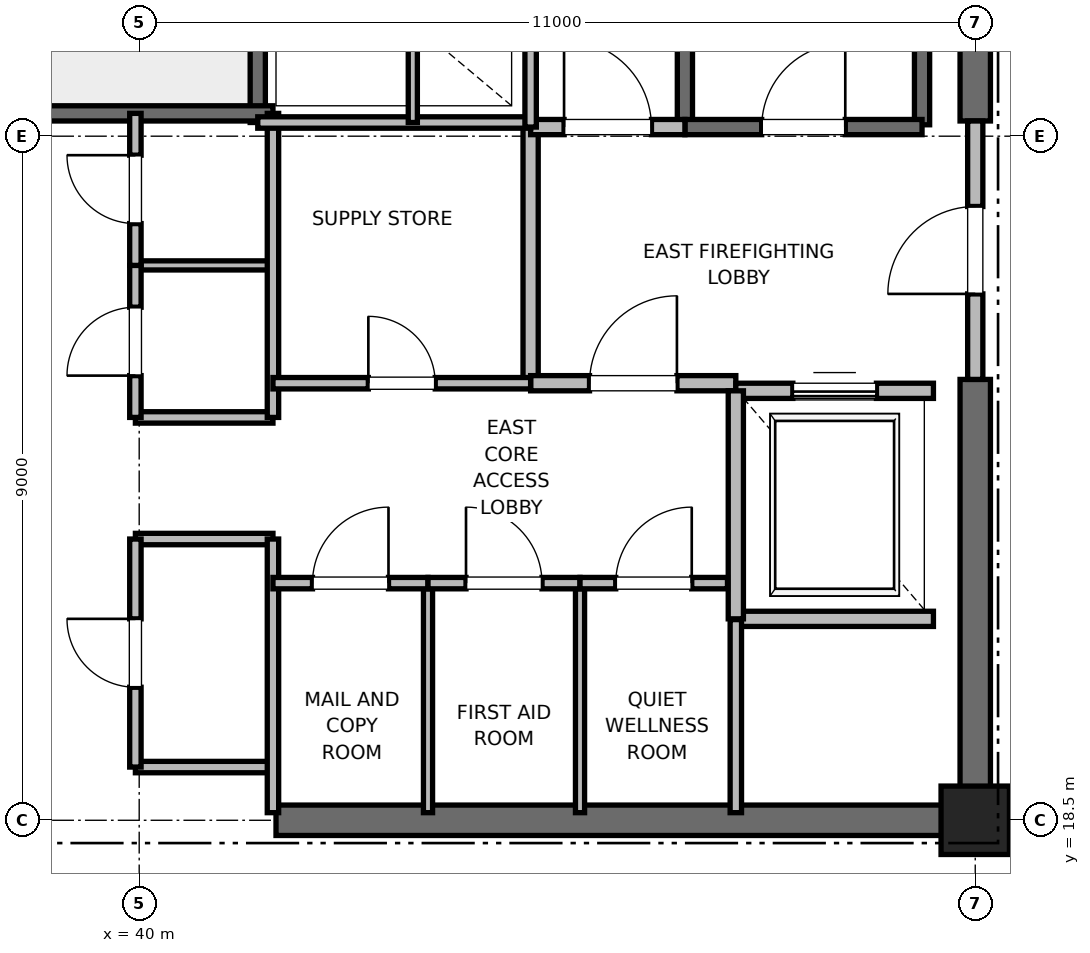
"""IFC4 building model, lengths in metres.
Left out: names, types, materials, properties, quantities, classifications, styles, units other than length and angle.
Written with IfcOpenShell. Run it as: python <this file> out.ifc"""

import sys

from ifc_helpers import new_model, si_unit, direction, frame, frame_2d, origin, origin_2d, place, context, subcontext, project, spatial, rectangle, extrude, element, fill, save


model = new_model("IFC4")
c1 = context("Model", 3, precision=1e-05, world=origin(), true_north=direction((0.0, 1.0)))
c2 = subcontext(c1, "Body", "Model", "MODEL_VIEW")
j1 = project(units=[si_unit("LENGTHUNIT", "METRE"), si_unit("PLANEANGLEUNIT", "RADIAN")], contexts=[c1])
p1 = place(None, origin())
s1 = spatial("IfcSite", under=j1, at=p1, CompositionType="ELEMENT")
p2 = place(p1, origin())
s2 = spatial("IfcBuilding", under=s1, at=p2, CompositionType="ELEMENT")
p3 = place(p2, frame((0.0, 0.0, 306.8)))
s3 = spatial("IfcBuildingStorey", under=s2, at=p3, CompositionType="ELEMENT", Elevation=306.8)
p4 = place(p3, frame((51.0, 18.5, 0.0), z_axis=(0.0, 0.0, 1.0), x_axis=(1.0, 0.0, 0.0)))
e1 = element("IfcColumn", 1, at=p4, inside=s3, PredefinedType="PILASTER", context=c2, shape_type="SweptSolid", body=[
    extrude(rectangle(XDim=0.9, YDim=0.9, at=origin_2d()), origin(), (0.0, 0.0, 1.0), 4.0),
])
p5 = place(p3, frame((41.8, 18.5, 0.0), z_axis=(0.0, 0.0, 1.0), x_axis=(1.0, 0.0, 0.0)))
e2 = element("IfcWall", 2, at=p5, inside=s3, PredefinedType="SHEAR", context=c2, shape_type="SweptSolid", body=[
    extrude(rectangle(XDim=9.2, YDim=0.4, at=frame_2d((4.6, 0.0))), origin(), (0.0, 0.0, 1.0), 3.785),
])
p6 = place(p3, frame((51.0, 18.5, 0.0), z_axis=(0.0, 0.0, 1.0), x_axis=(0.0, 1.0, 0.0)))
e3 = element("IfcWall", 3, at=p6, inside=s3, PredefinedType="SHEAR", context=c2, shape_type="SweptSolid", body=[
    extrude(rectangle(XDim=5.8, YDim=0.4, at=frame_2d((2.9, 0.0))), origin(), (0.0, 0.0, 1.0), 3.785),
])
p7 = place(p3, frame((51.0, 27.7, 0.0), z_axis=(0.0, 0.0, 1.0), x_axis=(0.0, 1.0, 0.0)))
e4 = element("IfcWall", 4, at=p7, inside=s3, PredefinedType="SHEAR", context=c2, shape_type="SweptSolid", body=[
    extrude(rectangle(XDim=8.8, YDim=0.4, at=frame_2d((4.4, 0.0))), origin(), (0.0, 0.0, 1.0), 3.785),
])
p8 = place(p3, frame((50.3, 27.65, 0.0), z_axis=(0.0, 0.0, 1.0), x_axis=(0.0, 1.0, 0.0)))
e5 = element("IfcWall", 5, at=p8, inside=s3, PredefinedType="SOLIDWALL", context=c2, shape_type="SweptSolid", body=[
    extrude(rectangle(XDim=8.15, YDim=0.2, at=frame_2d((4.075, 0.0))), origin(), (0.0, 0.0, 1.0), 3.785),
])
p9 = place(p3, frame((47.18, 27.62, 0.0), z_axis=(0.0, 0.0, 1.0), x_axis=(0.0, 1.0, 0.0)))
e6 = element("IfcWall", 6, at=p9, inside=s3, PredefinedType="SOLIDWALL", context=c2, shape_type="SweptSolid", body=[
    extrude(rectangle(XDim=8.18, YDim=0.2, at=frame_2d((4.09, 0.0))), origin(), (0.0, 0.0, 1.0), 3.785),
])
p10 = place(p3, frame((47.18, 27.62, 0.0), z_axis=(0.0, 0.0, 1.0), x_axis=(1.0, 0.0, 0.0)))
e7 = element("IfcWall", 7, at=p10, inside=s3, PredefinedType="SOLIDWALL", context=c2, shape_type="SweptSolid", body=[
    extrude(rectangle(XDim=3.12, YDim=0.2, at=frame_2d((1.56, 0.0))), origin(), (0.0, 0.0, 1.0), 3.785),
])
p11 = place(p10, frame((1.01, 0.0, 0.0)))
e8 = element("IfcOpeningElement", 8, at=p11, cuts=e7, PredefinedType="OPENING", context=c2, shape_type="SweptSolid", body=[
    extrude(rectangle(XDim=1.1, YDim=2.15, at=frame_2d((0.55, 1.075))), frame((0.0, 0.1, 0.0), z_axis=(0.0, -1.0, 0.0), x_axis=(1.0, 0.0, 0.0)), (0.0, 0.0, 1.0), 0.2),
])
p12 = place(p3, frame((41.56, 27.68, 0.0), z_axis=(0.0, 0.0, 1.0), x_axis=(0.0, 1.0, 0.0)))
e9 = element("IfcWall", 9, at=p12, inside=s3, PredefinedType="SOLIDWALL", context=c2, shape_type="SweptSolid", body=[
    extrude(rectangle(XDim=8.57, YDim=0.2, at=frame_2d((4.285, 0.0))), origin(), (0.0, 0.0, 1.0), 3.785),
])
p13 = place(p3, frame((38.44, 27.8, 0.0), z_axis=(0.0, 0.0, 1.0), x_axis=(1.0, 0.0, 0.0)))
e10 = element("IfcWall", 10, at=p13, inside=s3, PredefinedType="SOLIDWALL", context=c2, shape_type="SweptSolid", body=[
    extrude(rectangle(XDim=3.32, YDim=0.2, at=frame_2d((1.66, 0.0))), origin(), (0.0, 0.0, 1.0), 3.785),
])
p14 = place(p3, frame((45.15, 24.25, 0.0), z_axis=(0.0, 0.0, 1.0), x_axis=(0.0, 1.0, 0.0)))
e11 = element("IfcWall", 11, at=p14, inside=s3, PredefinedType="PARTITIONING", context=c2, shape_type="SweptSolid", body=[
    extrude(rectangle(XDim=3.37, YDim=0.2, at=frame_2d((1.685, 0.0))), origin(), (0.0, 0.0, 1.0), 3.785),
])
p15 = place(p3, frame((45.15, 24.25, 0.0), z_axis=(0.0, 0.0, 1.0), x_axis=(1.0, 0.0, 0.0)))
e12 = element("IfcWall", 12, at=p15, inside=s3, PredefinedType="PARTITIONING", context=c2, shape_type="SweptSolid", body=[
    extrude(rectangle(XDim=2.7, YDim=0.2, at=frame_2d((1.35, 0.0))), origin(), (0.0, 0.0, 1.0), 3.785),
])
p16 = place(p15, frame((0.775, 0.0, 0.0)))
e13 = element("IfcOpeningElement", 13, at=p16, cuts=e12, PredefinedType="OPENING", context=c2, shape_type="SweptSolid", body=[
    extrude(rectangle(XDim=1.15, YDim=2.2, at=frame_2d((0.575, 1.1))), frame((0.0, 0.1, 0.0), z_axis=(0.0, -1.0, 0.0), x_axis=(1.0, 0.0, 0.0)), (0.0, 0.0, 1.0), 0.2),
])
p17 = place(p3, frame((45.15, 27.62, 0.0), z_axis=(0.0, 0.0, 1.0), x_axis=(1.0, 0.0, 0.0)))
e14 = element("IfcWall", 14, at=p17, inside=s3, PredefinedType="PARTITIONING", context=c2, shape_type="SweptSolid", body=[
    extrude(rectangle(XDim=2.03, YDim=0.2, at=frame_2d((1.015, 0.0))), origin(), (0.0, 0.0, 1.0), 3.785),
])
p18 = place(p17, frame((0.44, 0.0, 0.0)))
e15 = element("IfcOpeningElement", 15, at=p18, cuts=e14, PredefinedType="OPENING", context=c2, shape_type="SweptSolid", body=[
    extrude(rectangle(XDim=1.15, YDim=2.2, at=frame_2d((0.575, 1.1))), frame((0.0, 0.1, 0.0), z_axis=(0.0, -1.0, 0.0), x_axis=(1.0, 0.0, 0.0)), (0.0, 0.0, 1.0), 0.2),
])
p19 = place(p3, frame((51.0, 24.3, 0.0), z_axis=(0.0, 0.0, 1.0), x_axis=(0.0, 1.0, 0.0)))
e16 = element("IfcWall", 16, at=p19, inside=s3, PredefinedType="PARTITIONING", context=c2, shape_type="SweptSolid", body=[
    extrude(rectangle(XDim=3.4, YDim=0.2, at=frame_2d((1.7, 0.0))), origin(), (0.0, 0.0, 1.0), 2.865),
])
p20 = place(p19, frame((1.125, 0.0, 0.0)))
e17 = element("IfcOpeningElement", 17, at=p20, cuts=e16, PredefinedType="OPENING", context=c2, shape_type="SweptSolid", body=[
    extrude(rectangle(XDim=1.15, YDim=2.2, at=frame_2d((0.575, 1.1))), frame((0.0, 0.1, 0.0), z_axis=(0.0, -1.0, 0.0), x_axis=(1.0, 0.0, 0.0)), (0.0, 0.0, 1.0), 0.2),
])
p21 = place(p3, frame((47.85, 21.15, 0.0), z_axis=(0.0, 0.0, 1.0), x_axis=(1.0, 0.0, 0.0)))
e18 = element("IfcWall", 18, at=p21, inside=s3, PredefinedType="SOLIDWALL", context=c2, shape_type="SweptSolid", body=[
    extrude(rectangle(XDim=2.6, YDim=0.2, at=frame_2d((1.3, 0.0))), origin(), (0.0, 0.0, 1.0), 3.785),
])
p22 = place(p3, frame((50.45, 24.15, 0.0), z_axis=(0.0, 0.0, 1.0), x_axis=(-1.0, 0.0, 0.0)))
e19 = element("IfcWall", 19, at=p22, inside=s3, PredefinedType="SOLIDWALL", context=c2, shape_type="SweptSolid", body=[
    extrude(rectangle(XDim=2.6, YDim=0.2, at=frame_2d((1.3, 0.0))), origin(), (0.0, 0.0, 1.0), 2.865),
])
p23 = place(p22, frame((0.75, 0.0, 0.0)))
e20 = element("IfcOpeningElement", 20, at=p23, cuts=e19, PredefinedType="OPENING", context=c2, shape_type="SweptSolid", body=[
    extrude(rectangle(XDim=1.1, YDim=2.2, at=frame_2d((0.55, 1.1))), frame((0.0, 0.1, 0.0), z_axis=(0.0, -1.0, 0.0), x_axis=(1.0, 0.0, 0.0)), (0.0, 0.0, 1.0), 0.2),
])
p24 = place(p3, frame((47.85, 24.15, 0.0), z_axis=(0.0, 0.0, 1.0), x_axis=(0.0, -1.0, 0.0)))
e21 = element("IfcWall", 21, at=p24, inside=s3, PredefinedType="SOLIDWALL", context=c2, shape_type="SweptSolid", body=[
    extrude(rectangle(XDim=3.0, YDim=0.2, at=frame_2d((1.5, 0.0))), origin(), (0.0, 0.0, 1.0), 3.785),
])
for number, where, z_axis, x_axis in (
    (22, (39.95, 19.2, 0.0), (0.0, 0.0, 1.0), (1.0, 0.0, 0.0)),
    (23, (39.95, 22.2, 0.0), (0.0, 0.0, 1.0), (1.0, 0.0, 0.0)),
    (24, (39.95, 23.8, 0.0), (0.0, 0.0, 1.0), (1.0, 0.0, 0.0)),
):
    element("IfcWall", number, at=place(p3, frame(where, z_axis=z_axis, x_axis=x_axis)), inside=s3, PredefinedType="PARTITIONING", context=c2, shape_type="SweptSolid", body=[
        extrude(rectangle(XDim=1.81, YDim=0.15, at=frame_2d((0.905, 0.0))), origin(), (0.0, 0.0, 1.0), 2.85),
    ])
p25 = place(p3, frame((39.95, 25.8, 0.0), z_axis=(0.0, 0.0, 1.0), x_axis=(1.0, 0.0, 0.0)))
e25 = element("IfcWall", 25, at=p25, inside=s3, PredefinedType="PARTITIONING", context=c2, shape_type="SweptSolid", body=[
    extrude(rectangle(XDim=1.81, YDim=0.12, at=frame_2d((0.905, 0.0))), origin(), (0.0, 0.0, 1.0), 2.85),
])
p26 = place(p3, frame((41.76, 18.6, 0.0), z_axis=(0.0, 0.0, 1.0), x_axis=(0.0, 1.0, 0.0)))
e26 = element("IfcWall", 26, at=p26, inside=s3, PredefinedType="PARTITIONING", context=c2, shape_type="SweptSolid", body=[
    extrude(rectangle(XDim=3.6, YDim=0.15, at=frame_2d((1.8, 0.0))), origin(), (0.0, 0.0, 1.0), 2.85),
])
p27 = place(p3, frame((41.76, 23.8, 0.0), z_axis=(0.0, 0.0, 1.0), x_axis=(0.0, 1.0, 0.0)))
e27 = element("IfcWall", 27, at=p27, inside=s3, PredefinedType="PARTITIONING", context=c2, shape_type="SweptSolid", body=[
    extrude(rectangle(XDim=4.0, YDim=0.15, at=frame_2d((2.0, 0.0))), origin(), (0.0, 0.0, 1.0), 2.85),
])
p28 = place(p3, frame((39.95, 19.2, 0.0), z_axis=(0.0, 0.0, 1.0), x_axis=(0.0, 1.0, 0.0)))
e28 = element("IfcWall", 28, at=p28, inside=s3, PredefinedType="PARTITIONING", context=c2, shape_type="SweptSolid", body=[
    extrude(rectangle(XDim=3.0, YDim=0.15, at=frame_2d((1.5, 0.0))), origin(), (0.0, 0.0, 1.0), 2.85),
])
p29 = place(p28, frame((1.05, 0.0, 0.0)))
e29 = element("IfcOpeningElement", 29, at=p29, cuts=e28, PredefinedType="OPENING", context=c2, shape_type="SweptSolid", body=[
    extrude(rectangle(XDim=0.9, YDim=2.1, at=frame_2d((0.45, 1.05))), frame((0.0, 0.075, 0.0), z_axis=(0.0, -1.0, 0.0), x_axis=(1.0, 0.0, 0.0)), (0.0, 0.0, 1.0), 0.15),
])
p30 = place(p3, frame((39.95, 23.8, 0.0), z_axis=(0.0, 0.0, 1.0), x_axis=(0.0, 1.0, 0.0)))
e30 = element("IfcWall", 30, at=p30, inside=s3, PredefinedType="PARTITIONING", context=c2, shape_type="SweptSolid", body=[
    extrude(rectangle(XDim=2.0, YDim=0.15, at=frame_2d((1.0, 0.0))), origin(), (0.0, 0.0, 1.0), 2.85),
])
p31 = place(p30, frame((0.55, 0.0, 0.0)))
e31 = element("IfcOpeningElement", 31, at=p31, cuts=e30, PredefinedType="OPENING", context=c2, shape_type="SweptSolid", body=[
    extrude(rectangle(XDim=0.9, YDim=2.1, at=frame_2d((0.45, 1.05))), frame((0.0, 0.075, 0.0), z_axis=(0.0, -1.0, 0.0), x_axis=(1.0, 0.0, 0.0)), (0.0, 0.0, 1.0), 0.15),
])
p32 = place(p3, frame((39.95, 25.8, 0.0), z_axis=(0.0, 0.0, 1.0), x_axis=(0.0, 1.0, 0.0)))
e32 = element("IfcWall", 32, at=p32, inside=s3, PredefinedType="PARTITIONING", context=c2, shape_type="SweptSolid", body=[
    extrude(rectangle(XDim=2.0, YDim=0.15, at=frame_2d((1.0, 0.0))), origin(), (0.0, 0.0, 1.0), 2.85),
])
p33 = place(p32, frame((0.55, 0.0, 0.0)))
e33 = element("IfcOpeningElement", 33, at=p33, cuts=e32, PredefinedType="OPENING", context=c2, shape_type="SweptSolid", body=[
    extrude(rectangle(XDim=0.9, YDim=2.1, at=frame_2d((0.45, 1.05))), frame((0.0, 0.075, 0.0), z_axis=(0.0, -1.0, 0.0), x_axis=(1.0, 0.0, 0.0)), (0.0, 0.0, 1.0), 0.15),
])
p34 = place(p3, frame((41.56, 27.68, 0.0), z_axis=(0.0, 0.0, 1.0), x_axis=(1.0, 0.0, 0.0)))
e34 = element("IfcWall", 34, at=p34, inside=s3, PredefinedType="PARTITIONING", context=c2, shape_type="SweptSolid", body=[
    extrude(rectangle(XDim=3.59, YDim=0.15, at=frame_2d((1.795, 0.0))), origin(), (0.0, 0.0, 1.0), 2.85),
])
p35 = place(p3, frame((47.85, 18.6, 0.0), z_axis=(0.0, 0.0, 1.0), x_axis=(0.0, 1.0, 0.0)))
e35 = element("IfcWall", 35, at=p35, inside=s3, PredefinedType="PARTITIONING", context=c2, shape_type="SweptSolid", body=[
    extrude(rectangle(XDim=2.54, YDim=0.15, at=frame_2d((1.27, 0.0))), origin(), (0.0, 0.0, 1.0), 2.85),
])
for number, where, z_axis, x_axis in (
    (36, (43.8, 18.6, 0.0), (0.0, 0.0, 1.0), (0.0, 1.0, 0.0)),
    (37, (45.8, 18.6, 0.0), (0.0, 0.0, 1.0), (0.0, 1.0, 0.0)),
):
    element("IfcWall", number, at=place(p3, frame(where, z_axis=z_axis, x_axis=x_axis)), inside=s3, PredefinedType="PARTITIONING", context=c2, shape_type="SweptSolid", body=[
        extrude(rectangle(XDim=3.02, YDim=0.12, at=frame_2d((1.51, 0.0))), origin(), (0.0, 0.0, 1.0), 2.85),
    ])
p36 = place(p3, frame((41.76, 21.62, 0.0), z_axis=(0.0, 0.0, 1.0), x_axis=(1.0, 0.0, 0.0)))
e38 = element("IfcWall", 38, at=p36, inside=s3, PredefinedType="PARTITIONING", context=c2, shape_type="SweptSolid", body=[
    extrude(rectangle(XDim=2.04, YDim=0.15, at=frame_2d((1.02, 0.0))), origin(), (0.0, 0.0, 1.0), 2.85),
])
p37 = place(p36, frame((0.52, 0.0, 0.0)))
e39 = element("IfcOpeningElement", 39, at=p37, cuts=e38, PredefinedType="OPENING", context=c2, shape_type="SweptSolid", body=[
    extrude(rectangle(XDim=1.0, YDim=2.15, at=frame_2d((0.5, 1.075))), frame((0.0, 0.075, 0.0), z_axis=(0.0, -1.0, 0.0), x_axis=(1.0, 0.0, 0.0)), (0.0, 0.0, 1.0), 0.15),
])
p38 = place(p3, frame((43.8, 21.62, 0.0), z_axis=(0.0, 0.0, 1.0), x_axis=(1.0, 0.0, 0.0)))
e40 = element("IfcWall", 40, at=p38, inside=s3, PredefinedType="PARTITIONING", context=c2, shape_type="SweptSolid", body=[
    extrude(rectangle(XDim=2.0, YDim=0.15, at=frame_2d((1.0, 0.0))), origin(), (0.0, 0.0, 1.0), 2.85),
])
p39 = place(p38, frame((0.5, 0.0, 0.0)))
e41 = element("IfcOpeningElement", 41, at=p39, cuts=e40, PredefinedType="OPENING", context=c2, shape_type="SweptSolid", body=[
    extrude(rectangle(XDim=1.0, YDim=2.15, at=frame_2d((0.5, 1.075))), frame((0.0, 0.075, 0.0), z_axis=(0.0, -1.0, 0.0), x_axis=(1.0, 0.0, 0.0)), (0.0, 0.0, 1.0), 0.15),
])
p40 = place(p3, frame((45.8, 21.62, 0.0), z_axis=(0.0, 0.0, 1.0), x_axis=(1.0, 0.0, 0.0)))
e42 = element("IfcWall", 42, at=p40, inside=s3, PredefinedType="PARTITIONING", context=c2, shape_type="SweptSolid", body=[
    extrude(rectangle(XDim=1.94, YDim=0.15, at=frame_2d((0.97, 0.0))), origin(), (0.0, 0.0, 1.0), 2.85),
])
p41 = place(p40, frame((0.47, 0.0, 0.0)))
e43 = element("IfcOpeningElement", 43, at=p41, cuts=e42, PredefinedType="OPENING", context=c2, shape_type="SweptSolid", body=[
    extrude(rectangle(XDim=1.0, YDim=2.15, at=frame_2d((0.5, 1.075))), frame((0.0, 0.075, 0.0), z_axis=(0.0, -1.0, 0.0), x_axis=(1.0, 0.0, 0.0)), (0.0, 0.0, 1.0), 0.15),
])
p42 = place(p3, frame((41.76, 24.25, 0.0), z_axis=(0.0, 0.0, 1.0), x_axis=(1.0, 0.0, 0.0)))
e44 = element("IfcWall", 44, at=p42, inside=s3, PredefinedType="PARTITIONING", context=c2, shape_type="SweptSolid", body=[
    extrude(rectangle(XDim=3.39, YDim=0.15, at=frame_2d((1.695, 0.0))), origin(), (0.0, 0.0, 1.0), 2.85),
])
p43 = place(p42, frame((1.255, 0.0, 0.0)))
e45 = element("IfcOpeningElement", 45, at=p43, cuts=e44, PredefinedType="OPENING", context=c2, shape_type="SweptSolid", body=[
    extrude(rectangle(XDim=0.88, YDim=2.1, at=frame_2d((0.44, 1.05))), frame((0.0, 0.075, 0.0), z_axis=(0.0, -1.0, 0.0), x_axis=(1.0, 0.0, 0.0)), (0.0, 0.0, 1.0), 0.15),
])
p44 = place(p3, frame((45.15, 27.62, 0.0), z_axis=(0.0, 0.0, 1.0), x_axis=(0.0, 1.0, 0.0)))
e46 = element("IfcWall", 46, at=p44, inside=s3, PredefinedType="PARTITIONING", context=c2, shape_type="SweptSolid", body=[
    extrude(rectangle(XDim=3.1, YDim=0.15, at=frame_2d((1.55, 0.0))), origin(), (0.0, 0.0, 1.0), 2.85),
])
p45 = place(p3, frame((43.6, 27.68, 0.0), z_axis=(0.0, 0.0, 1.0), x_axis=(0.0, 1.0, 0.0)))
e47 = element("IfcWall", 47, at=p45, inside=s3, PredefinedType="PARTITIONING", context=c2, shape_type="SweptSolid", body=[
    extrude(rectangle(XDim=3.04, YDim=0.12, at=frame_2d((1.52, 0.0))), origin(), (0.0, 0.0, 1.0), 2.85),
])
p46 = place(p11, origin())
e48 = element("IfcDoor", 48, at=p46, inside=s3, OperationType="SINGLE_SWING_RIGHT", PredefinedType="DOOR", context=c2, shape_type="SweptSolid", body=[
    extrude(rectangle(XDim=1.1, YDim=2.15, at=frame_2d((0.55, 1.075))), frame((0.0, 0.025, 0.0), z_axis=(0.0, -1.0, 0.0), x_axis=(1.0, 0.0, 0.0)), (0.0, 0.0, 1.0), 0.05),
])
fill(e8, e48)
p47 = place(p16, origin())
e49 = element("IfcDoor", 49, at=p47, inside=s3, OperationType="SINGLE_SWING_RIGHT", PredefinedType="DOOR", context=c2, shape_type="SweptSolid", body=[
    extrude(rectangle(XDim=1.15, YDim=2.2, at=frame_2d((0.575, 1.1))), frame((0.0, 0.025, 0.0), z_axis=(0.0, -1.0, 0.0), x_axis=(1.0, 0.0, 0.0)), (0.0, 0.0, 1.0), 0.05),
])
fill(e13, e49)
p48 = place(p18, origin())
e50 = element("IfcDoor", 50, at=p48, inside=s3, OperationType="SINGLE_SWING_LEFT", PredefinedType="DOOR", context=c2, shape_type="SweptSolid", body=[
    extrude(rectangle(XDim=1.15, YDim=2.2, at=frame_2d((0.575, 1.1))), frame((0.0, 0.025, 0.0), z_axis=(0.0, -1.0, 0.0), x_axis=(1.0, 0.0, 0.0)), (0.0, 0.0, 1.0), 0.05),
])
fill(e15, e50)
p49 = place(p20, origin())
e51 = element("IfcDoor", 51, at=p49, inside=s3, OperationType="SINGLE_SWING_LEFT", PredefinedType="DOOR", context=c2, shape_type="SweptSolid", body=[
    extrude(rectangle(XDim=1.15, YDim=2.2, at=frame_2d((0.575, 1.1))), frame((0.0, 0.025, 0.0), z_axis=(0.0, -1.0, 0.0), x_axis=(1.0, 0.0, 0.0)), (0.0, 0.0, 1.0), 0.05),
])
fill(e17, e51)
p50 = place(p23, origin())
e52 = element("IfcDoor", 52, at=p50, inside=s3, OperationType="SLIDING_TO_RIGHT", PredefinedType="DOOR", context=c2, shape_type="SweptSolid", body=[
    extrude(rectangle(XDim=1.1, YDim=2.2, at=frame_2d((0.55, 1.1))), frame((0.0, 0.025, 0.0), z_axis=(0.0, -1.0, 0.0), x_axis=(1.0, 0.0, 0.0)), (0.0, 0.0, 1.0), 0.05),
])
fill(e20, e52)
p51 = place(p29, origin())
e53 = element("IfcDoor", 53, at=p51, inside=s3, OperationType="SINGLE_SWING_RIGHT", PredefinedType="DOOR", context=c2, shape_type="SweptSolid", body=[
    extrude(rectangle(XDim=0.9, YDim=2.1, at=frame_2d((0.45, 1.05))), frame((0.0, 0.025, 0.0), z_axis=(0.0, -1.0, 0.0), x_axis=(1.0, 0.0, 0.0)), (0.0, 0.0, 1.0), 0.05),
])
fill(e29, e53)
p52 = place(p31, origin())
e54 = element("IfcDoor", 54, at=p52, inside=s3, OperationType="SINGLE_SWING_LEFT", PredefinedType="DOOR", context=c2, shape_type="SweptSolid", body=[
    extrude(rectangle(XDim=0.9, YDim=2.1, at=frame_2d((0.45, 1.05))), frame((0.0, 0.025, 0.0), z_axis=(0.0, -1.0, 0.0), x_axis=(1.0, 0.0, 0.0)), (0.0, 0.0, 1.0), 0.05),
])
fill(e31, e54)
p53 = place(p33, origin())
e55 = element("IfcDoor", 55, at=p53, inside=s3, OperationType="SINGLE_SWING_RIGHT", PredefinedType="DOOR", context=c2, shape_type="SweptSolid", body=[
    extrude(rectangle(XDim=0.9, YDim=2.1, at=frame_2d((0.45, 1.05))), frame((0.0, 0.025, 0.0), z_axis=(0.0, -1.0, 0.0), x_axis=(1.0, 0.0, 0.0)), (0.0, 0.0, 1.0), 0.05),
])
fill(e33, e55)
p54 = place(p37, origin())
e56 = element("IfcDoor", 56, at=p54, inside=s3, OperationType="SINGLE_SWING_RIGHT", PredefinedType="DOOR", context=c2, shape_type="SweptSolid", body=[
    extrude(rectangle(XDim=1.0, YDim=2.15, at=frame_2d((0.5, 1.075))), frame((0.0, 0.025, 0.0), z_axis=(0.0, -1.0, 0.0), x_axis=(1.0, 0.0, 0.0)), (0.0, 0.0, 1.0), 0.05),
])
fill(e39, e56)
p55 = place(p39, origin())
e57 = element("IfcDoor", 57, at=p55, inside=s3, OperationType="SINGLE_SWING_LEFT", PredefinedType="DOOR", context=c2, shape_type="SweptSolid", body=[
    extrude(rectangle(XDim=1.0, YDim=2.15, at=frame_2d((0.5, 1.075))), frame((0.0, 0.025, 0.0), z_axis=(0.0, -1.0, 0.0), x_axis=(1.0, 0.0, 0.0)), (0.0, 0.0, 1.0), 0.05),
])
fill(e41, e57)
p56 = place(p41, origin())
e58 = element("IfcDoor", 58, at=p56, inside=s3, OperationType="SINGLE_SWING_RIGHT", PredefinedType="DOOR", context=c2, shape_type="SweptSolid", body=[
    extrude(rectangle(XDim=1.0, YDim=2.15, at=frame_2d((0.5, 1.075))), frame((0.0, 0.025, 0.0), z_axis=(0.0, -1.0, 0.0), x_axis=(1.0, 0.0, 0.0)), (0.0, 0.0, 1.0), 0.05),
])
fill(e43, e58)
p57 = place(p43, origin())
e59 = element("IfcDoor", 59, at=p57, inside=s3, OperationType="SINGLE_SWING_LEFT", PredefinedType="DOOR", context=c2, shape_type="SweptSolid", body=[
    extrude(rectangle(XDim=0.88, YDim=2.1, at=frame_2d((0.44, 1.05))), frame((0.0, 0.025, 0.0), z_axis=(0.0, -1.0, 0.0), x_axis=(1.0, 0.0, 0.0)), (0.0, 0.0, 1.0), 0.05),
])
fill(e45, e59)
save(model, sys.argv[1])
